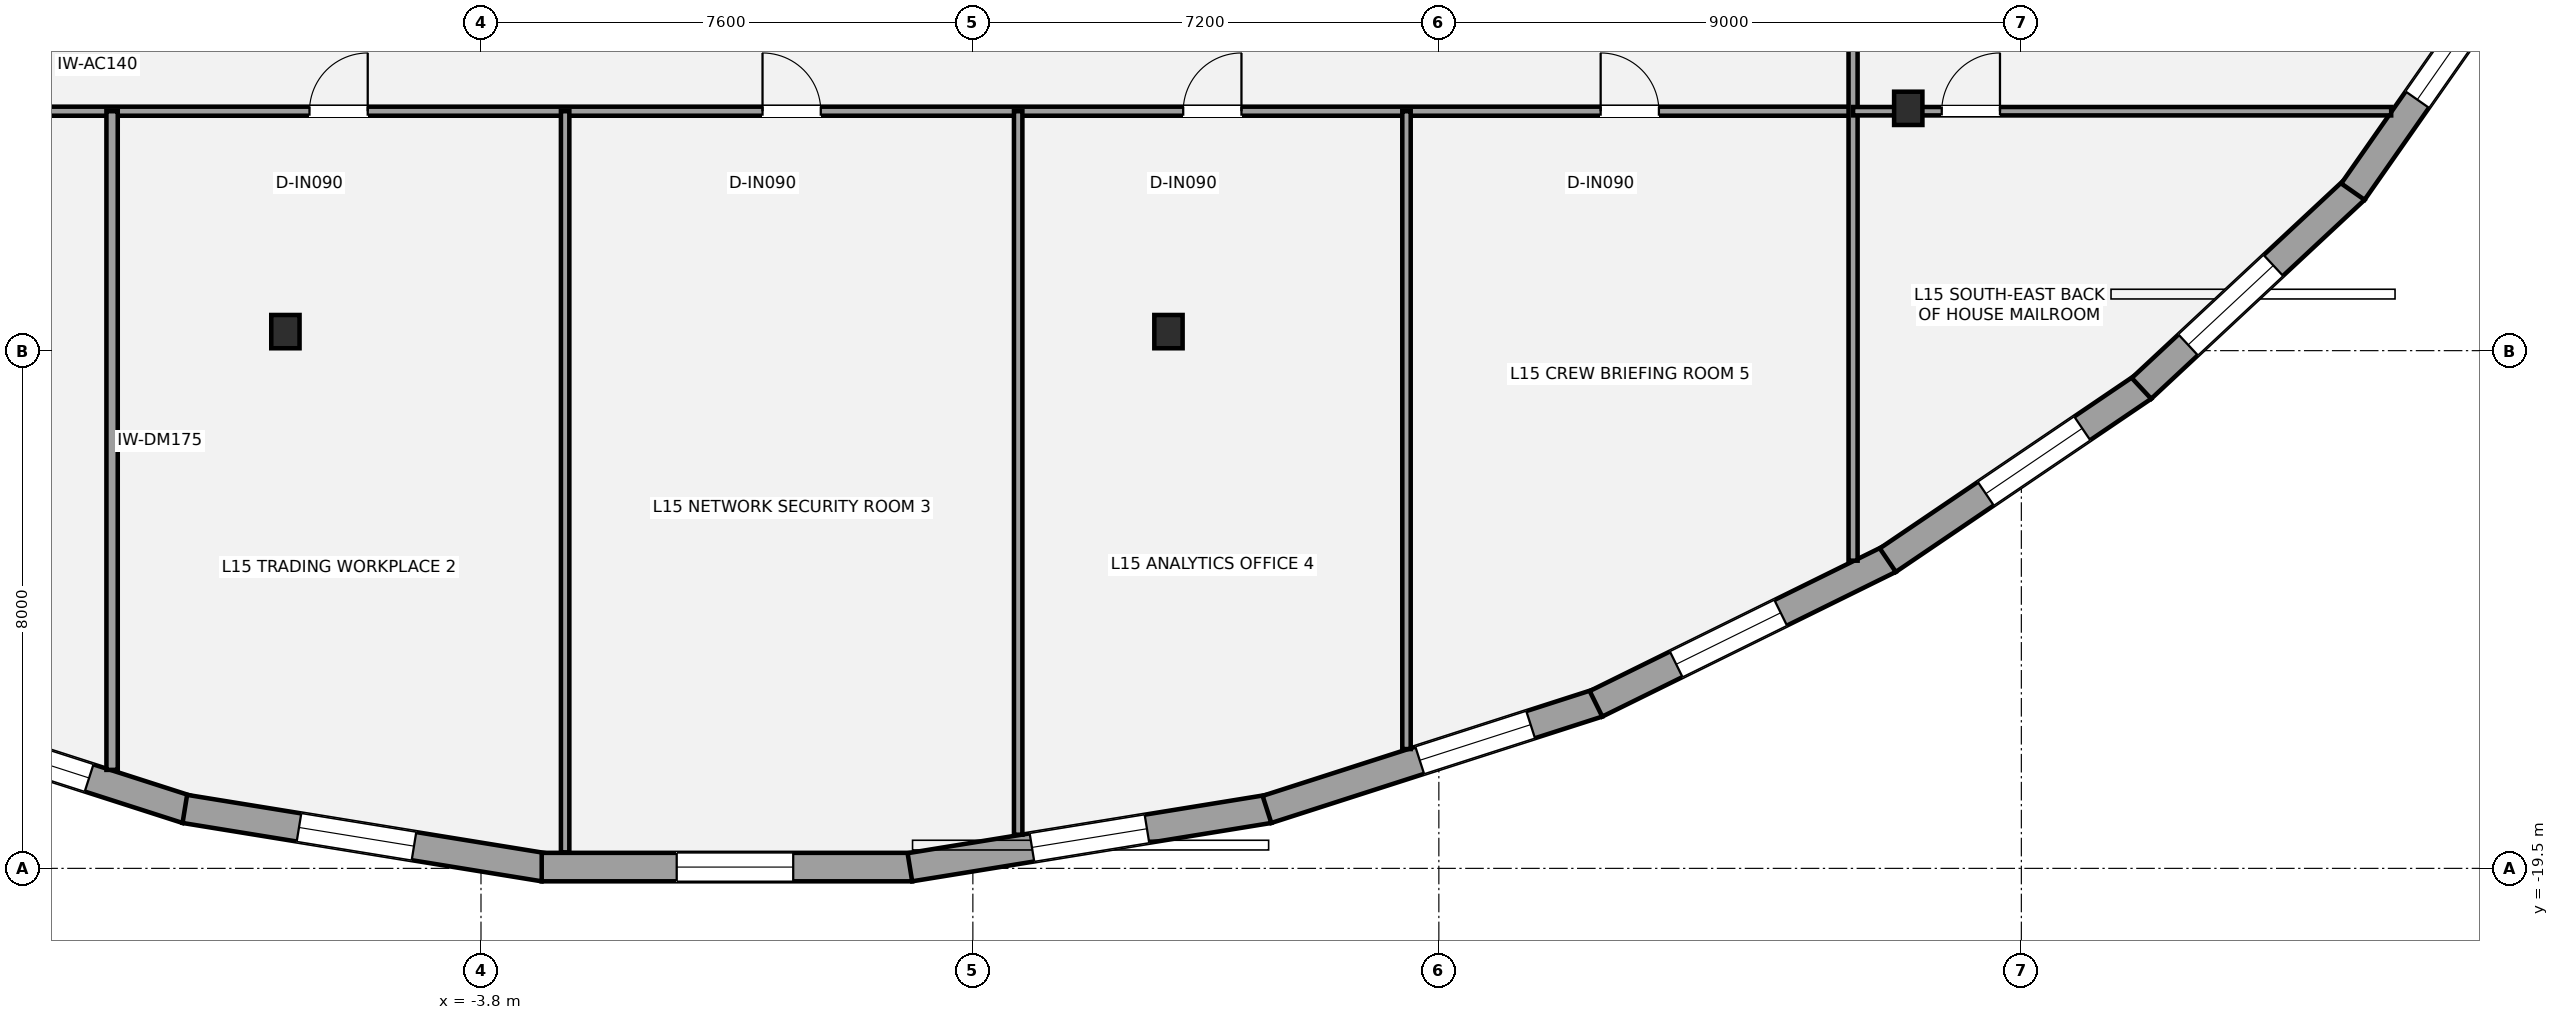
"""IFC4 building model, lengths in metres.
Left out: names, types, materials, properties, quantities, classifications, styles, units other than length and angle.
Written with IfcOpenShell. Run it as: python <this file> out.ifc"""

import sys

from ifc_helpers import new_model, si_unit, direction, frame, frame_2d, origin, origin_2d, place, context, subcontext, project, spatial, rectangle, i_section, extrude, element, fill, save


model = new_model("IFC4")
c1 = context("Model", 3, precision=1e-05, world=origin(), true_north=direction((0.0, 1.0)))
c2 = subcontext(c1, "Body", "Model", "MODEL_VIEW")
j1 = project(units=[si_unit("LENGTHUNIT", "METRE"), si_unit("PLANEANGLEUNIT", "RADIAN")], contexts=[c1])
p1 = place(None, origin())
s1 = spatial("IfcSite", under=j1, at=p1, CompositionType="ELEMENT")
p2 = place(p1, origin())
s2 = spatial("IfcBuilding", under=s1, at=p2, CompositionType="ELEMENT")
p3 = place(p2, frame((0.0, 0.0, 59.4)))
s3 = spatial("IfcBuildingStorey", under=s2, at=p3, CompositionType="ELEMENT", Elevation=59.4)
for number, where, z_axis, x_axis in (
    (1, (-6.822, -11.206, 0.0), (0.0, 0.0, 1.0), (1.0, 0.0, 0.0)),
    (2, (6.822, -11.206, 0.0), (0.0, 0.0, 1.0), (1.0, 0.0, 0.0)),
    (3, (18.253, -7.756, 0.0), (0.0, 0.0, 1.0), (1.0, 0.0, 0.0)),
):
    element("IfcColumn", number, at=place(p3, frame(where, z_axis=z_axis, x_axis=x_axis)), inside=s3, PredefinedType="COLUMN", context=c2, shape_type="SweptSolid", body=[
        extrude(i_section(OverallWidth=0.437, OverallDepth=0.514, WebThickness=0.061, FlangeThickness=0.097, at=origin_2d()), origin(), (0.0, 0.0, 1.0), 3.6),
    ])
p4 = place(p3, frame((-8.344, -18.589, 0.0), z_axis=(0.0, 0.0, 1.0), x_axis=(-0.95202383213, 0.30602389295, 0.0)))
e4 = element("IfcWall", 4, at=p4, inside=s3, PredefinedType="STANDARD", context=c2, shape_type="SweptSolid", body=[
    extrude(rectangle(XDim=5.372, YDim=0.44, at=frame_2d((2.686, 0.0))), origin(), (0.0, 0.0, 1.0), 2.529),
])
p5 = place(p4, frame((1.587, 0.0, 0.65)))
e5 = element("IfcOpeningElement", 5, at=p5, cuts=e4, PredefinedType="OPENING", context=c2, shape_type="SweptSolid", body=[
    extrude(rectangle(XDim=1.8, YDim=1.7, at=frame_2d((0.9, 0.85))), frame((0.0, 0.23, 0.0), z_axis=(0.0, -1.0, 0.0), x_axis=(1.0, 0.0, 0.0)), (0.0, 0.0, 1.0), 0.46),
])
p6 = place(p3, frame((-2.827, -19.483, 0.0), z_axis=(0.0, 0.0, 1.0), x_axis=(-0.987057031186, 0.160369626756, 0.0)))
e6 = element("IfcWall", 6, at=p6, inside=s3, PredefinedType="STANDARD", context=c2, shape_type="SweptSolid", body=[
    extrude(rectangle(XDim=5.622, YDim=0.44, at=frame_2d((2.811, 0.0))), origin(), (0.0, 0.0, 1.0), 2.529),
])
p7 = place(p6, frame((2.035, 0.0, 0.65)))
e7 = element("IfcOpeningElement", 7, at=p7, cuts=e6, PredefinedType="OPENING", context=c2, shape_type="SweptSolid", body=[
    extrude(rectangle(XDim=1.8, YDim=1.7, at=frame_2d((0.9, 0.85))), frame((0.0, 0.23, 0.0), z_axis=(0.0, -1.0, 0.0), x_axis=(1.0, 0.0, 0.0)), (0.0, 0.0, 1.0), 0.46),
])
p8 = place(p3, frame((2.862, -19.48, 0.0), z_axis=(0.0, 0.0, 1.0), x_axis=(-1.0, 0.0, 0.0)))
e8 = element("IfcWall", 8, at=p8, inside=s3, PredefinedType="STANDARD", context=c2, shape_type="SweptSolid", body=[
    extrude(rectangle(XDim=5.724, YDim=0.44, at=frame_2d((2.862, 0.0))), origin(), (0.0, 0.0, 1.0), 2.533),
])
p9 = place(p8, frame((1.838, 0.0, 0.65)))
e9 = element("IfcOpeningElement", 9, at=p9, cuts=e8, PredefinedType="OPENING", context=c2, shape_type="SweptSolid", body=[
    extrude(rectangle(XDim=1.8, YDim=1.7, at=frame_2d((0.9, 0.85))), frame((0.0, 0.23, 0.0), z_axis=(0.0, -1.0, 0.0), x_axis=(1.0, 0.0, 0.0)), (0.0, 0.0, 1.0), 0.46),
])
p10 = place(p3, frame((8.376, -18.581, 0.0), z_axis=(0.0, 0.0, 1.0), x_axis=(-0.987057031186, -0.160369626756, 0.0)))
e10 = element("IfcWall", 10, at=p10, inside=s3, PredefinedType="STANDARD", context=c2, shape_type="SweptSolid", body=[
    extrude(rectangle(XDim=5.622, YDim=0.44, at=frame_2d((2.811, 0.0))), origin(), (0.0, 0.0, 1.0), 2.529),
])
p11 = place(p10, frame((1.911, 0.0, 0.48)))
e11 = element("IfcOpeningElement", 11, at=p11, cuts=e10, PredefinedType="OPENING", context=c2, shape_type="SweptSolid", body=[
    extrude(rectangle(XDim=1.8, YDim=1.7, at=frame_2d((0.9, 0.85))), frame((0.0, 0.23, 0.0), z_axis=(0.0, -1.0, 0.0), x_axis=(1.0, 0.0, 0.0)), (0.0, 0.0, 1.0), 0.46),
])
p12 = place(p3, frame((13.458, -16.945, 0.0), z_axis=(0.0, 0.0, 1.0), x_axis=(-0.95202383213, -0.30602389295, 0.0)))
e12 = element("IfcWall", 12, at=p12, inside=s3, PredefinedType="STANDARD", context=c2, shape_type="SweptSolid", body=[
    extrude(rectangle(XDim=5.372, YDim=0.44, at=frame_2d((2.686, 0.0))), origin(), (0.0, 0.0, 1.0), 2.529),
])
p13 = place(p12, frame((1.092, 0.0, 0.65)))
e13 = element("IfcOpeningElement", 13, at=p13, cuts=e12, PredefinedType="OPENING", context=c2, shape_type="SweptSolid", body=[
    extrude(rectangle(XDim=1.8, YDim=1.7, at=frame_2d((0.9, 0.85))), frame((0.0, 0.23, 0.0), z_axis=(0.0, -1.0, 0.0), x_axis=(1.0, 0.0, 0.0)), (0.0, 0.0, 1.0), 0.46),
])
p14 = place(p3, frame((17.963, -14.722, 0.0), z_axis=(0.0, 0.0, 1.0), x_axis=(-0.896962161347, -0.442107318545, 0.0)))
e14 = element("IfcWall", 14, at=p14, inside=s3, PredefinedType="STANDARD", context=c2, shape_type="SweptSolid", body=[
    extrude(rectangle(XDim=5.056, YDim=0.44, at=frame_2d((2.528, 0.0))), origin(), (0.0, 0.0, 1.0), 2.529),
])
p15 = place(p14, frame((1.874, 0.0, 0.65)))
e15 = element("IfcOpeningElement", 15, at=p15, cuts=e14, PredefinedType="OPENING", context=c2, shape_type="SweptSolid", body=[
    extrude(rectangle(XDim=1.8, YDim=1.7, at=frame_2d((0.9, 0.85))), frame((0.0, 0.23, 0.0), z_axis=(0.0, -1.0, 0.0), x_axis=(1.0, 0.0, 0.0)), (0.0, 0.0, 1.0), 0.46),
])
p16 = place(p3, frame((21.883, -12.062, 0.0), z_axis=(0.0, 0.0, 1.0), x_axis=(-0.827723816917, -0.561135708103, 0.0)))
e16 = element("IfcWall", 16, at=p16, inside=s3, PredefinedType="STANDARD", context=c2, shape_type="SweptSolid", body=[
    extrude(rectangle(XDim=4.768, YDim=0.44, at=frame_2d((2.384, 0.0))), origin(), (0.0, 0.0, 1.0), 2.529),
])
p17 = place(p16, frame((1.138, 0.0, 0.65)))
e17 = element("IfcOpeningElement", 17, at=p17, cuts=e16, PredefinedType="OPENING", context=c2, shape_type="SweptSolid", body=[
    extrude(rectangle(XDim=1.8, YDim=1.7, at=frame_2d((0.9, 0.85))), frame((0.0, 0.23, 0.0), z_axis=(0.0, -1.0, 0.0), x_axis=(1.0, 0.0, 0.0)), (0.0, 0.0, 1.0), 0.46),
])
p18 = place(p3, frame((25.153, -9.009, 0.0), z_axis=(0.0, 0.0, 1.0), x_axis=(-0.731343335822, -0.682009475849, 0.0)))
e18 = element("IfcWall", 18, at=p18, inside=s3, PredefinedType="STANDARD", context=c2, shape_type="SweptSolid", body=[
    extrude(rectangle(XDim=4.508, YDim=0.44, at=frame_2d((2.254, 0.0))), origin(), (0.0, 0.0, 1.0), 2.529),
])
p19 = place(p18, frame((1.722, 0.0, 0.65)))
e19 = element("IfcOpeningElement", 19, at=p19, cuts=e18, PredefinedType="OPENING", context=c2, shape_type="SweptSolid", body=[
    extrude(rectangle(XDim=1.8, YDim=1.7, at=frame_2d((0.9, 0.85))), frame((0.0, 0.23, 0.0), z_axis=(0.0, -1.0, 0.0), x_axis=(1.0, 0.0, 0.0)), (0.0, 0.0, 1.0), 0.46),
])
p20 = place(p3, frame((27.548, -5.576, 0.0), z_axis=(0.0, 0.0, 1.0), x_axis=(-0.573152463572, -0.819448749771, 0.0)))
e20 = element("IfcWall", 20, at=p20, inside=s3, PredefinedType="STANDARD", context=c2, shape_type="SweptSolid", body=[
    extrude(rectangle(XDim=4.231, YDim=0.44, at=frame_2d((2.115, 0.0))), origin(), (0.0, 0.0, 1.0), 2.529),
])
p21 = place(p20, frame((0.695, 0.0, 0.65)))
e21 = element("IfcOpeningElement", 21, at=p21, cuts=e20, PredefinedType="OPENING", context=c2, shape_type="SweptSolid", body=[
    extrude(rectangle(XDim=1.8, YDim=1.7, at=frame_2d((0.9, 0.85))), frame((0.0, 0.23, 0.0), z_axis=(0.0, -1.0, 0.0), x_axis=(1.0, 0.0, 0.0)), (0.0, 0.0, 1.0), 0.46),
])
p22 = place(p3, frame((-17.4, -7.8, 0.0), z_axis=(0.0, 0.0, 1.0), x_axis=(1.0, 0.0, 0.0)))
e22 = element("IfcWall", 22, at=p22, inside=s3, PredefinedType="PARTITIONING", context=c2, shape_type="SweptSolid", body=[
    extrude(rectangle(XDim=34.8, YDim=0.14, at=frame_2d((17.4, 0.0))), origin(), (0.0, 0.0, 1.0), 2.779),
])
p23 = place(p22, frame((3.5, 0.0, 0.0)))
e23 = element("IfcOpeningElement", 23, at=p23, cuts=e22, PredefinedType="OPENING", context=c2, shape_type="SweptSolid", body=[
    extrude(rectangle(XDim=0.9, YDim=2.1, at=frame_2d((0.45, 1.05))), frame((0.0, 0.08, 0.0), z_axis=(0.0, -1.0, 0.0), x_axis=(1.0, 0.0, 0.0)), (0.0, 0.0, 1.0), 0.16),
])
p24 = place(p22, frame((10.95, 0.0, 0.0)))
e24 = element("IfcOpeningElement", 24, at=p24, cuts=e22, PredefinedType="OPENING", context=c2, shape_type="SweptSolid", body=[
    extrude(rectangle(XDim=0.9, YDim=2.1, at=frame_2d((0.45, 1.05))), frame((0.0, 0.08, 0.0), z_axis=(0.0, -1.0, 0.0), x_axis=(1.0, 0.0, 0.0)), (0.0, 0.0, 1.0), 0.16),
])
p25 = place(p22, frame((17.95, 0.0, 0.0)))
e25 = element("IfcOpeningElement", 25, at=p25, cuts=e22, PredefinedType="OPENING", context=c2, shape_type="SweptSolid", body=[
    extrude(rectangle(XDim=0.9, YDim=2.1, at=frame_2d((0.45, 1.05))), frame((0.0, 0.08, 0.0), z_axis=(0.0, -1.0, 0.0), x_axis=(1.0, 0.0, 0.0)), (0.0, 0.0, 1.0), 0.16),
])
p26 = place(p22, frame((24.45, 0.0, 0.0)))
e26 = element("IfcOpeningElement", 26, at=p26, cuts=e22, PredefinedType="OPENING", context=c2, shape_type="SweptSolid", body=[
    extrude(rectangle(XDim=0.9, YDim=2.1, at=frame_2d((0.45, 1.05))), frame((0.0, 0.08, 0.0), z_axis=(0.0, -1.0, 0.0), x_axis=(1.0, 0.0, 0.0)), (0.0, 0.0, 1.0), 0.16),
])
p27 = place(p22, frame((30.9, 0.0, 0.0)))
e27 = element("IfcOpeningElement", 27, at=p27, cuts=e22, PredefinedType="OPENING", context=c2, shape_type="SweptSolid", body=[
    extrude(rectangle(XDim=0.9, YDim=2.1, at=frame_2d((0.45, 1.05))), frame((0.0, 0.08, 0.0), z_axis=(0.0, -1.0, 0.0), x_axis=(1.0, 0.0, 0.0)), (0.0, 0.0, 1.0), 0.16),
])
p28 = place(p3, frame((17.4, -14.745, 0.0), z_axis=(0.0, 0.0, 1.0), x_axis=(0.0, 1.0, 0.0)))
e28 = element("IfcWall", 28, at=p28, inside=s3, PredefinedType="PARTITIONING", context=c2, shape_type="SweptSolid", body=[
    extrude(rectangle(XDim=20.595, YDim=0.14, at=frame_2d((10.298, 0.0))), origin(), (0.0, 0.0, 1.0), 2.841),
])
p29 = place(p28, frame((11.645, 0.0, 0.0)))
e29 = element("IfcOpeningElement", 29, at=p29, cuts=e28, PredefinedType="OPENING", context=c2, shape_type="SweptSolid", body=[
    extrude(rectangle(XDim=0.9, YDim=2.1, at=frame_2d((0.45, 1.05))), frame((0.0, 0.08, 0.0), z_axis=(0.0, -1.0, 0.0), x_axis=(1.0, 0.0, 0.0)), (0.0, 0.0, 1.0), 0.16),
])
p30 = place(p28, frame((18.47, 0.0, 0.0)))
e30 = element("IfcOpeningElement", 30, at=p30, cuts=e28, PredefinedType="OPENING", context=c2, shape_type="SweptSolid", body=[
    extrude(rectangle(XDim=0.9, YDim=2.1, at=frame_2d((0.45, 1.05))), frame((0.0, 0.08, 0.0), z_axis=(0.0, -1.0, 0.0), x_axis=(1.0, 0.0, 0.0)), (0.0, 0.0, 1.0), 0.16),
])
p31 = place(p3, frame((-9.5, -17.978, 0.0), z_axis=(0.0, 0.0, 1.0), x_axis=(0.0, 1.0, 0.0)))
e31 = element("IfcWall", 31, at=p31, inside=s3, PredefinedType="PARTITIONING", context=c2, shape_type="SweptSolid", body=[
    extrude(rectangle(XDim=10.178, YDim=0.175, at=frame_2d((5.089, 0.0))), origin(), (0.0, 0.0, 1.0), 2.853),
])
p32 = place(p3, frame((-2.5, -19.252, 0.0), z_axis=(0.0, 0.0, 1.0), x_axis=(0.0, 1.0, 0.0)))
e32 = element("IfcWall", 32, at=p32, inside=s3, PredefinedType="PARTITIONING", context=c2, shape_type="SweptSolid", body=[
    extrude(rectangle(XDim=11.452, YDim=0.13, at=frame_2d((5.726, 0.0))), origin(), (0.0, 0.0, 1.0), 2.853),
])
p33 = place(p3, frame((4.5, -18.98, 0.0), z_axis=(0.0, 0.0, 1.0), x_axis=(0.0, 1.0, 0.0)))
e33 = element("IfcWall", 33, at=p33, inside=s3, PredefinedType="PARTITIONING", context=c2, shape_type="SweptSolid", body=[
    extrude(rectangle(XDim=11.18, YDim=0.13, at=frame_2d((5.59, 0.0))), origin(), (0.0, 0.0, 1.0), 2.853),
])
p34 = place(p3, frame((10.5, -17.656, 0.0), z_axis=(0.0, 0.0, 1.0), x_axis=(0.0, 1.0, 0.0)))
e34 = element("IfcWall", 34, at=p34, inside=s3, PredefinedType="PARTITIONING", context=c2, shape_type="SweptSolid", body=[
    extrude(rectangle(XDim=9.856, YDim=0.13, at=frame_2d((4.928, 0.0))), origin(), (0.0, 0.0, 1.0), 3.4),
])
p35 = place(p3, frame((17.4, -7.8, 0.0), z_axis=(0.0, 0.0, 1.0), x_axis=(1.0, 0.0, 0.0)))
e35 = element("IfcWall", 35, at=p35, inside=s3, PredefinedType="PARTITIONING", context=c2, shape_type="SweptSolid", body=[
    extrude(rectangle(XDim=8.314, YDim=0.13, at=frame_2d((4.157, 0.0))), origin(), (0.0, 0.0, 1.0), 2.779),
])
p36 = place(p35, frame((1.37, 0.0, 0.0)))
e36 = element("IfcOpeningElement", 36, at=p36, cuts=e35, PredefinedType="OPENING", context=c2, shape_type="SweptSolid", body=[
    extrude(rectangle(XDim=0.9, YDim=2.1, at=frame_2d((0.45, 1.05))), frame((0.0, 0.075, 0.0), z_axis=(0.0, -1.0, 0.0), x_axis=(1.0, 0.0, 0.0)), (0.0, 0.0, 1.0), 0.15),
])
p37 = place(p5, origin())
e37 = element("IfcWindow", 37, at=p37, inside=s3, PartitioningType="SINGLE_PANEL", PredefinedType="WINDOW", context=c2, shape_type="SweptSolid", body=[
    extrude(rectangle(XDim=1.8, YDim=1.7, at=frame_2d((0.9, 0.85))), frame((0.0, -0.01, 0.0), z_axis=(0.0, -1.0, 0.0), x_axis=(1.0, 0.0, 0.0)), (0.0, 0.0, 1.0), 0.06),
])
fill(e5, e37)
p38 = place(p7, origin())
e38 = element("IfcWindow", 38, at=p38, inside=s3, PartitioningType="SINGLE_PANEL", PredefinedType="WINDOW", context=c2, shape_type="SweptSolid", body=[
    extrude(rectangle(XDim=1.8, YDim=1.7, at=frame_2d((0.9, 0.85))), frame((0.0, -0.01, 0.0), z_axis=(0.0, -1.0, 0.0), x_axis=(1.0, 0.0, 0.0)), (0.0, 0.0, 1.0), 0.06),
])
fill(e7, e38)
p39 = place(p9, origin())
e39 = element("IfcWindow", 39, at=p39, inside=s3, PartitioningType="SINGLE_PANEL", PredefinedType="WINDOW", context=c2, shape_type="SweptSolid", body=[
    extrude(rectangle(XDim=1.8, YDim=1.7, at=frame_2d((0.9, 0.85))), frame((0.0, -0.01, 0.0), z_axis=(0.0, -1.0, 0.0), x_axis=(1.0, 0.0, 0.0)), (0.0, 0.0, 1.0), 0.06),
])
fill(e9, e39)
p40 = place(p11, origin())
e40 = element("IfcWindow", 40, at=p40, inside=s3, PartitioningType="SINGLE_PANEL", PredefinedType="WINDOW", context=c2, shape_type="SweptSolid", body=[
    extrude(rectangle(XDim=1.8, YDim=1.7, at=frame_2d((0.9, 0.85))), frame((0.0, -0.01, 0.0), z_axis=(0.0, -1.0, 0.0), x_axis=(1.0, 0.0, 0.0)), (0.0, 0.0, 1.0), 0.06),
])
fill(e11, e40)
p41 = place(p13, origin())
e41 = element("IfcWindow", 41, at=p41, inside=s3, PartitioningType="SINGLE_PANEL", PredefinedType="WINDOW", context=c2, shape_type="SweptSolid", body=[
    extrude(rectangle(XDim=1.8, YDim=1.7, at=frame_2d((0.9, 0.85))), frame((0.0, -0.01, 0.0), z_axis=(0.0, -1.0, 0.0), x_axis=(1.0, 0.0, 0.0)), (0.0, 0.0, 1.0), 0.06),
])
fill(e13, e41)
p42 = place(p15, origin())
e42 = element("IfcWindow", 42, at=p42, inside=s3, PartitioningType="SINGLE_PANEL", PredefinedType="WINDOW", context=c2, shape_type="SweptSolid", body=[
    extrude(rectangle(XDim=1.8, YDim=1.7, at=frame_2d((0.9, 0.85))), frame((0.0, -0.01, 0.0), z_axis=(0.0, -1.0, 0.0), x_axis=(1.0, 0.0, 0.0)), (0.0, 0.0, 1.0), 0.06),
])
fill(e15, e42)
p43 = place(p17, origin())
e43 = element("IfcWindow", 43, at=p43, inside=s3, PartitioningType="SINGLE_PANEL", PredefinedType="WINDOW", context=c2, shape_type="SweptSolid", body=[
    extrude(rectangle(XDim=1.8, YDim=1.7, at=frame_2d((0.9, 0.85))), frame((0.0, -0.01, 0.0), z_axis=(0.0, -1.0, 0.0), x_axis=(1.0, 0.0, 0.0)), (0.0, 0.0, 1.0), 0.06),
])
fill(e17, e43)
p44 = place(p19, origin())
e44 = element("IfcWindow", 44, at=p44, inside=s3, PartitioningType="SINGLE_PANEL", PredefinedType="WINDOW", context=c2, shape_type="SweptSolid", body=[
    extrude(rectangle(XDim=1.8, YDim=1.7, at=frame_2d((0.9, 0.85))), frame((0.0, -0.01, 0.0), z_axis=(0.0, -1.0, 0.0), x_axis=(1.0, 0.0, 0.0)), (0.0, 0.0, 1.0), 0.06),
])
fill(e19, e44)
p45 = place(p21, origin())
e45 = element("IfcWindow", 45, at=p45, inside=s3, PartitioningType="SINGLE_PANEL", PredefinedType="WINDOW", context=c2, shape_type="SweptSolid", body=[
    extrude(rectangle(XDim=1.8, YDim=1.7, at=frame_2d((0.9, 0.85))), frame((0.0, -0.01, 0.0), z_axis=(0.0, -1.0, 0.0), x_axis=(1.0, 0.0, 0.0)), (0.0, 0.0, 1.0), 0.06),
])
fill(e21, e45)
p46 = place(p24, origin())
e46 = element("IfcDoor", 46, at=p46, inside=s3, OperationType="SINGLE_SWING_RIGHT", PredefinedType="DOOR", context=c2, shape_type="SweptSolid", body=[
    extrude(rectangle(XDim=0.9, YDim=2.1, at=frame_2d((0.45, 1.05))), frame((0.0, 0.025, 0.0), z_axis=(0.0, -1.0, 0.0), x_axis=(1.0, 0.0, 0.0)), (0.0, 0.0, 1.0), 0.05),
])
fill(e24, e46)
p47 = place(p25, origin())
e47 = element("IfcDoor", 47, at=p47, inside=s3, OperationType="SINGLE_SWING_LEFT", PredefinedType="DOOR", context=c2, shape_type="SweptSolid", body=[
    extrude(rectangle(XDim=0.9, YDim=2.1, at=frame_2d((0.45, 1.05))), frame((0.0, 0.025, 0.0), z_axis=(0.0, -1.0, 0.0), x_axis=(1.0, 0.0, 0.0)), (0.0, 0.0, 1.0), 0.05),
])
fill(e25, e47)
p48 = place(p26, origin())
e48 = element("IfcDoor", 48, at=p48, inside=s3, OperationType="SINGLE_SWING_RIGHT", PredefinedType="DOOR", context=c2, shape_type="SweptSolid", body=[
    extrude(rectangle(XDim=0.9, YDim=2.1, at=frame_2d((0.45, 1.05))), frame((0.0, 0.025, 0.0), z_axis=(0.0, -1.0, 0.0), x_axis=(1.0, 0.0, 0.0)), (0.0, 0.0, 1.0), 0.05),
])
fill(e26, e48)
p49 = place(p27, origin())
e49 = element("IfcDoor", 49, at=p49, inside=s3, OperationType="SINGLE_SWING_LEFT", PredefinedType="DOOR", context=c2, shape_type="SweptSolid", body=[
    extrude(rectangle(XDim=0.9, YDim=2.1, at=frame_2d((0.45, 1.05))), frame((0.0, 0.025, 0.0), z_axis=(0.0, -1.0, 0.0), x_axis=(1.0, 0.0, 0.0)), (0.0, 0.0, 1.0), 0.05),
])
fill(e27, e49)
p50 = place(p36, origin())
e50 = element("IfcDoor", 50, at=p50, inside=s3, OperationType="SINGLE_SWING_RIGHT", PredefinedType="DOOR", context=c2, shape_type="SweptSolid", body=[
    extrude(rectangle(XDim=0.9, YDim=2.1, at=frame_2d((0.45, 1.05))), frame((0.0, 0.025, 0.0), z_axis=(0.0, -1.0, 0.0), x_axis=(1.0, 0.0, 0.0)), (0.0, 0.0, 1.0), 0.05),
])
fill(e36, e50)
save(model, sys.argv[1])
